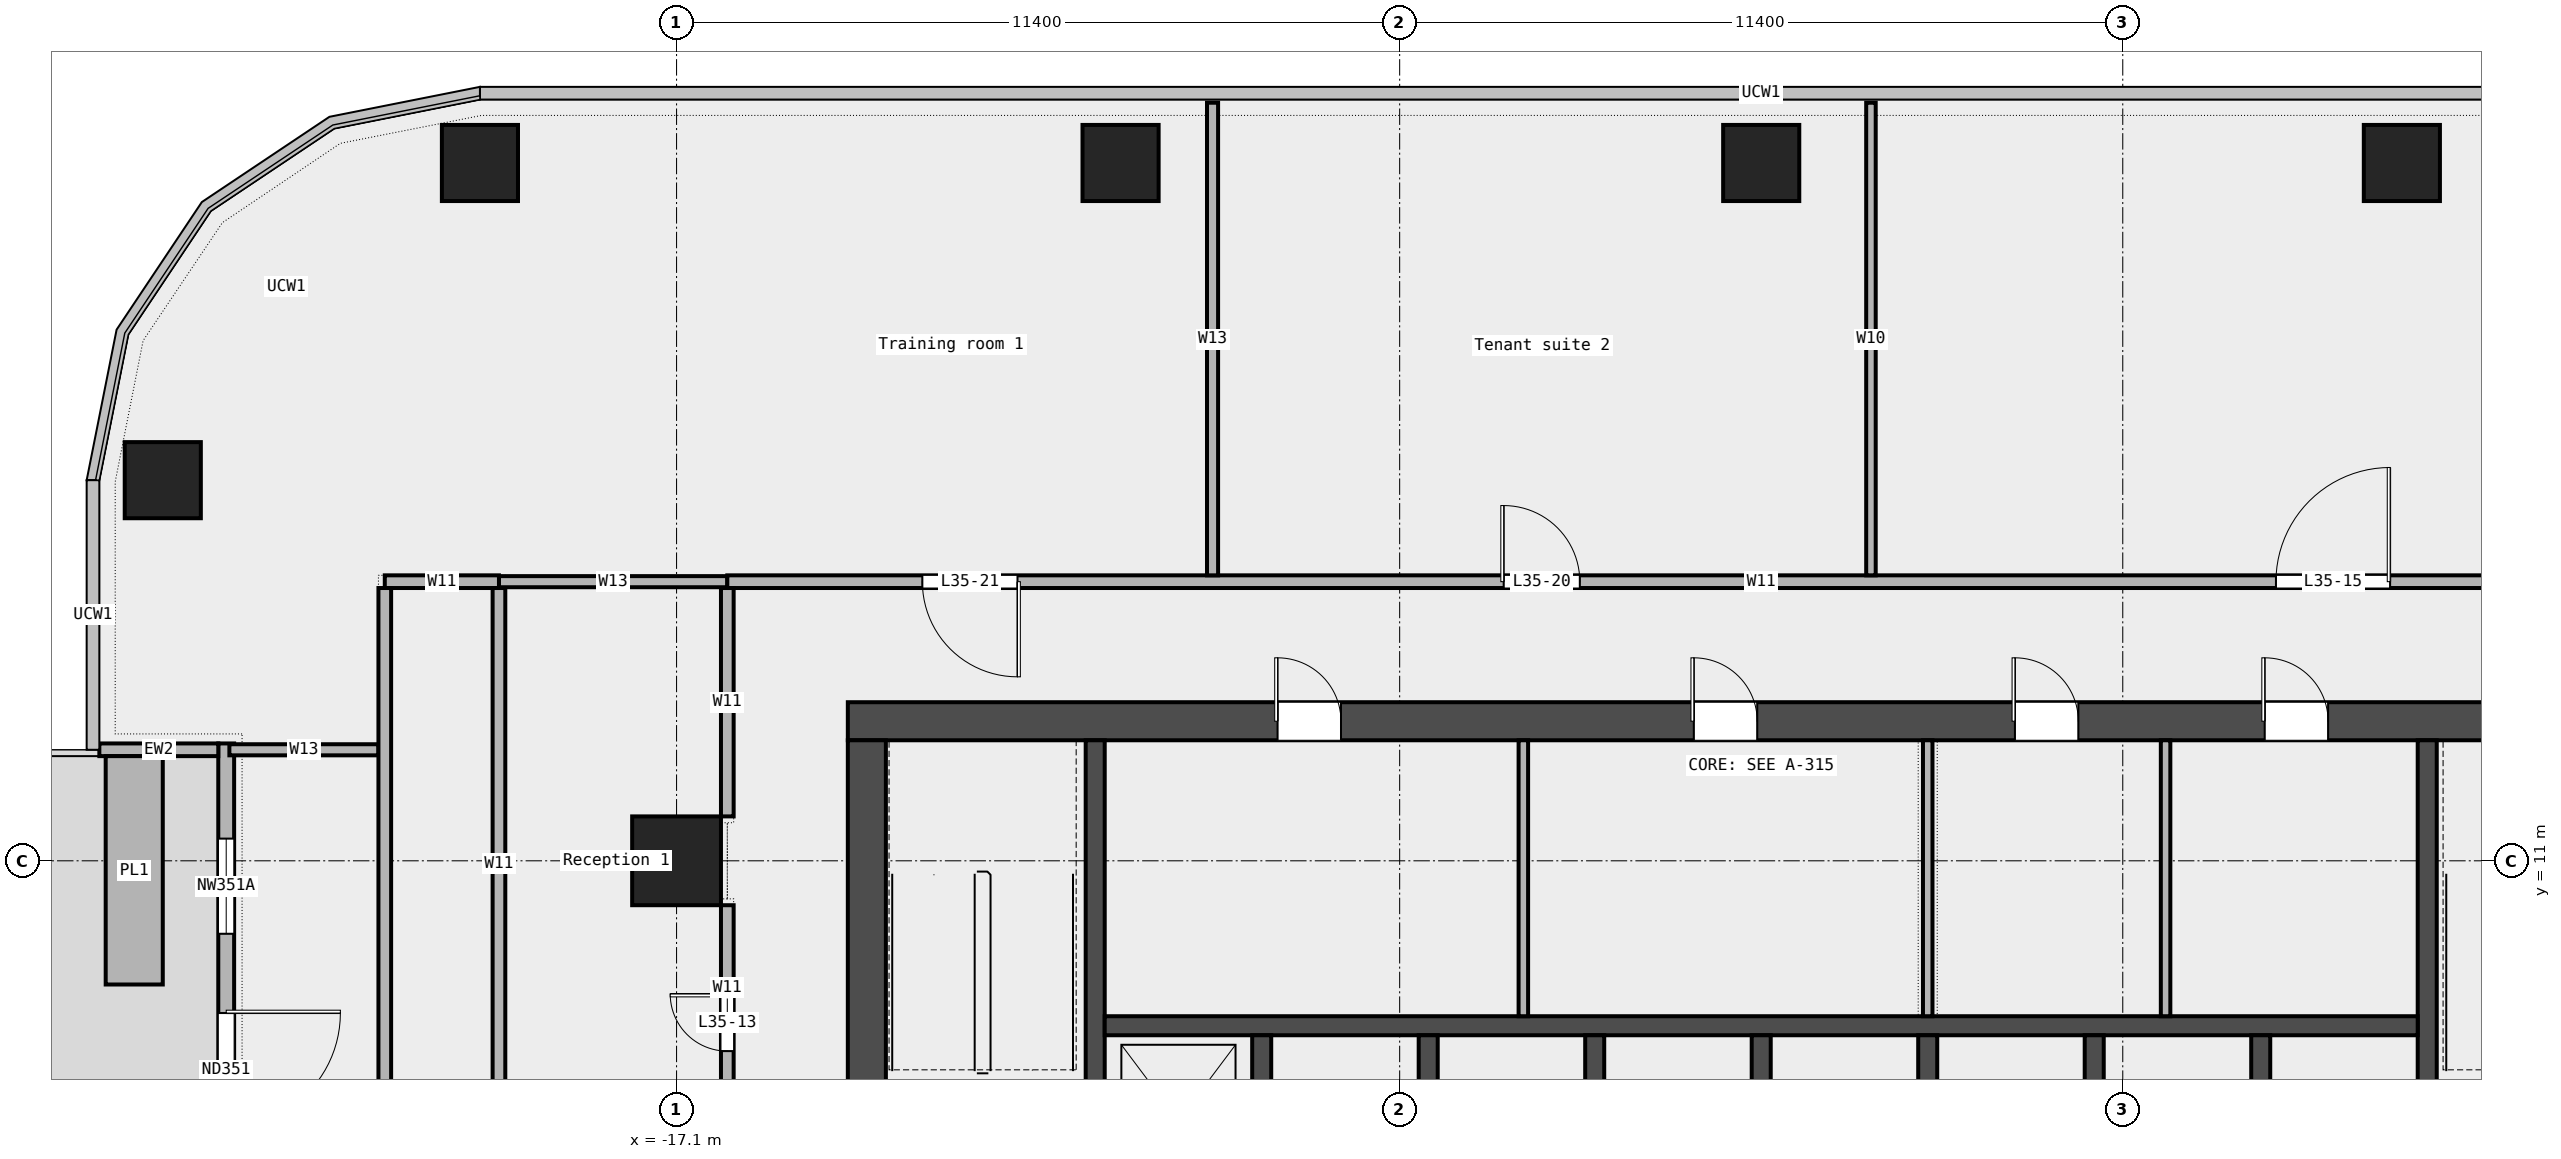
"""IFC4 building model, lengths in metres.
Left out: names, types, materials, properties, quantities, classifications, styles, units other than length and angle.
Written with IfcOpenShell. Run it as: python <this file> out.ifc"""

import sys

from ifc_helpers import new_model, si_unit, direction, frame, frame_2d, origin, origin_2d, place, context, subcontext, project, spatial, rectangle, extrude, element, fill, save


model = new_model("IFC4")
c1 = context("Model", 3, precision=1e-05, world=origin(), true_north=direction((0.0, 1.0)))
c2 = subcontext(c1, "Body", "Model", "MODEL_VIEW")
j1 = project(units=[si_unit("LENGTHUNIT", "METRE"), si_unit("PLANEANGLEUNIT", "RADIAN")], contexts=[c1])
p1 = place(None, origin())
s1 = spatial("IfcSite", under=j1, at=p1, CompositionType="ELEMENT")
p2 = place(p1, origin())
s2 = spatial("IfcBuilding", under=s1, at=p2, CompositionType="ELEMENT")
p3 = place(p2, frame((0.0, 0.0, 173.0)))
s3 = spatial("IfcBuildingStorey", under=s2, at=p3, CompositionType="ELEMENT", Elevation=173.0)
for number, where, z_axis, x_axis in (
    (1, (10.1, 22.0, 0.0), (0.0, 0.0, 1.0), (1.0, 0.0, 0.0)),
    (2, (0.0, 22.0, 0.0), (0.0, 0.0, 1.0), (1.0, 0.0, 0.0)),
    (3, (-10.1, 22.0, 0.0), (0.0, 0.0, 1.0), (1.0, 0.0, 0.0)),
    (4, (-20.2, 22.0, 0.0), (0.0, 0.0, 1.0), (1.0, 0.0, 0.0)),
    (5, (-25.2, 17.0, 0.0), (0.0, 0.0, 1.0), (1.0, 0.0, 0.0)),
):
    element("IfcColumn", number, at=place(p3, frame(where, z_axis=z_axis, x_axis=x_axis)), inside=s3, PredefinedType="COLUMN", context=c2, shape_type="SweptSolid", body=[
        extrude(rectangle(XDim=1.2, YDim=1.2, at=origin_2d()), origin(), (0.0, 0.0, 1.0), 3.6),
    ])
p4 = place(p3, frame((-17.1, 11.0, 0.0), z_axis=(0.0, 0.0, 1.0), x_axis=(1.0, 0.0, 0.0)))
e6 = element("IfcColumn", 6, at=p4, inside=s3, PredefinedType="COLUMN", context=c2, shape_type="SweptSolid", body=[
    extrude(rectangle(XDim=1.4, YDim=1.4, at=origin_2d()), origin(), (0.0, 0.0, 1.0), 3.6),
])
p5 = place(p3, frame((-24.2, 12.85, 0.0), z_axis=(0.0, 0.0, 1.0), x_axis=(0.0, -1.0, 0.0)))
e7 = element("IfcWall", 7, at=p5, inside=s3, PredefinedType="STANDARD", context=c2, shape_type="SweptSolid", body=[
    extrude(rectangle(XDim=12.95, YDim=0.25, at=frame_2d((6.475, 0.0))), origin(), (0.0, 0.0, 1.0), 3.6),
])
p6 = place(p5, frame((1.5, 0.0, 0.45)))
e8 = element("IfcOpeningElement", 8, at=p6, cuts=e7, PredefinedType="OPENING", context=c2, shape_type="SweptSolid", body=[
    extrude(rectangle(XDim=1.5, YDim=2.4, at=frame_2d((0.75, 1.2))), frame((0.0, 0.137, 0.0), z_axis=(0.0, -1.0, 0.0), x_axis=(1.0, 0.0, 0.0)), (0.0, 0.0, 1.0), 0.274),
])
p7 = place(p5, frame((4.25, 0.0, 0.0)))
e9 = element("IfcOpeningElement", 9, at=p7, cuts=e7, PredefinedType="OPENING", context=c2, shape_type="SweptSolid", body=[
    extrude(rectangle(XDim=1.8, YDim=2.4, at=frame_2d((0.9, 1.2))), frame((0.0, 0.137, 0.0), z_axis=(0.0, -1.0, 0.0), x_axis=(1.0, 0.0, 0.0)), (0.0, 0.0, 1.0), 0.274),
])
p8 = place(p5, frame((10.0, 0.0, 0.45)))
e10 = element("IfcOpeningElement", 10, at=p8, cuts=e7, PredefinedType="OPENING", context=c2, shape_type="SweptSolid", body=[
    extrude(rectangle(XDim=1.5, YDim=2.4, at=frame_2d((0.75, 1.2))), frame((0.0, 0.137, 0.0), z_axis=(0.0, -1.0, 0.0), x_axis=(1.0, 0.0, 0.0)), (0.0, 0.0, 1.0), 0.274),
])
p9 = place(p3, frame((-26.2, 12.75, 0.0), z_axis=(0.0, 0.0, 1.0), x_axis=(1.0, 0.0, 0.0)))
e11 = element("IfcWall", 11, at=p9, inside=s3, PredefinedType="STANDARD", context=c2, shape_type="SweptSolid", body=[
    extrude(rectangle(XDim=1.875, YDim=0.2, at=frame_2d((0.938, 0.0))), origin(), (0.0, 0.0, 1.0), 3.6),
])
p10 = place(p3, frame((-25.65, 12.65, 0.0), z_axis=(0.0, 0.0, 1.0), x_axis=(0.0, -1.0, 0.0)))
e12 = element("IfcWall", 12, at=p10, inside=s3, PredefinedType="STANDARD", context=c2, shape_type="SweptSolid", body=[
    extrude(rectangle(XDim=3.6, YDim=0.9, at=frame_2d((1.8, 0.0))), origin(), (0.0, 0.0, 1.0), 0.7),
])
p11 = place(p3, frame((-24.15, 12.75, 0.0), z_axis=(0.0, 0.0, 1.0), x_axis=(1.0, 0.0, 0.0)))
e13 = element("IfcWall", 13, at=p11, inside=s3, PredefinedType="PARTITIONING", context=c2, shape_type="SweptSolid", body=[
    extrude(rectangle(XDim=2.35, YDim=0.175, at=frame_2d((1.175, 0.0))), origin(), (0.0, 0.0, 1.0), 3.6),
])
p12 = place(p3, frame((-19.9, 15.4, 0.0), z_axis=(0.0, 0.0, 1.0), x_axis=(1.0, 0.0, 0.0)))
e14 = element("IfcWall", 14, at=p12, inside=s3, PredefinedType="PARTITIONING", context=c2, shape_type="SweptSolid", body=[
    extrude(rectangle(XDim=3.6, YDim=0.175, at=frame_2d((1.8, 0.0))), origin(), (0.0, 0.0, 1.0), 3.6),
])
p13 = place(p3, frame((-21.7, 15.4, 0.0), z_axis=(0.0, 0.0, 1.0), x_axis=(1.0, 0.0, 0.0)))
e15 = element("IfcWall", 15, at=p13, inside=s3, PredefinedType="PARTITIONING", context=c2, shape_type="SweptSolid", body=[
    extrude(rectangle(XDim=1.8, YDim=0.2, at=frame_2d((0.9, 0.0))), origin(), (0.0, 0.0, 1.0), 3.6),
])
p14 = place(p3, frame((-16.3, 15.4, 0.0), z_axis=(0.0, 0.0, 1.0), x_axis=(1.0, 0.0, 0.0)))
e16 = element("IfcWall", 16, at=p14, inside=s3, PredefinedType="PARTITIONING", context=c2, shape_type="SweptSolid", body=[
    extrude(rectangle(XDim=32.6, YDim=0.2, at=frame_2d((16.3, 0.0))), origin(), (0.0, 0.0, 1.0), 3.6),
])
p15 = place(p14, frame((24.415, 0.0, 0.0)))
e17 = element("IfcOpeningElement", 17, at=p15, cuts=e16, PredefinedType="OPENING", context=c2, shape_type="SweptSolid", body=[
    extrude(rectangle(XDim=1.8, YDim=2.1, at=frame_2d((0.9, 1.05))), frame((0.0, 0.112, 0.0), z_axis=(0.0, -1.0, 0.0), x_axis=(1.0, 0.0, 0.0)), (0.0, 0.0, 1.0), 0.224),
])
p16 = place(p14, frame((12.24, 0.0, 0.0)))
e18 = element("IfcOpeningElement", 18, at=p16, cuts=e16, PredefinedType="OPENING", context=c2, shape_type="SweptSolid", body=[
    extrude(rectangle(XDim=1.2, YDim=2.1, at=frame_2d((0.6, 1.05))), frame((0.0, 0.112, 0.0), z_axis=(0.0, -1.0, 0.0), x_axis=(1.0, 0.0, 0.0)), (0.0, 0.0, 1.0), 0.224),
])
p17 = place(p14, frame((3.075, 0.0, 0.0)))
e19 = element("IfcOpeningElement", 19, at=p17, cuts=e16, PredefinedType="OPENING", context=c2, shape_type="SweptSolid", body=[
    extrude(rectangle(XDim=1.5, YDim=2.1, at=frame_2d((0.75, 1.05))), frame((0.0, 0.112, 0.0), z_axis=(0.0, -1.0, 0.0), x_axis=(1.0, 0.0, 0.0)), (0.0, 0.0, 1.0), 0.224),
])
p18 = place(p3, frame((-21.7, -9.0, 0.0), z_axis=(0.0, 0.0, 1.0), x_axis=(0.0, 1.0, 0.0)))
e20 = element("IfcWall", 20, at=p18, inside=s3, PredefinedType="PARTITIONING", context=c2, shape_type="SweptSolid", body=[
    extrude(rectangle(XDim=24.3, YDim=0.2, at=frame_2d((12.15, 0.0))), origin(), (0.0, 0.0, 1.0), 3.6),
])
p19 = place(p18, frame((14.925, 0.0, 0.0)))
e21 = element("IfcOpeningElement", 21, at=p19, cuts=e20, PredefinedType="OPENING", context=c2, shape_type="SweptSolid", body=[
    extrude(rectangle(XDim=0.9, YDim=2.1, at=frame_2d((0.45, 1.05))), frame((0.0, 0.112, 0.0), z_axis=(0.0, -1.0, 0.0), x_axis=(1.0, 0.0, 0.0)), (0.0, 0.0, 1.0), 0.224),
])
p20 = place(p18, frame((2.562, 0.0, 0.0)))
e22 = element("IfcOpeningElement", 22, at=p20, cuts=e20, PredefinedType="OPENING", context=c2, shape_type="SweptSolid", body=[
    extrude(rectangle(XDim=0.9, YDim=2.1, at=frame_2d((0.45, 1.05))), frame((0.0, 0.112, 0.0), z_axis=(0.0, -1.0, 0.0), x_axis=(1.0, 0.0, 0.0)), (0.0, 0.0, 1.0), 0.224),
])
p21 = place(p3, frame((-19.9, 6.6, 0.0), z_axis=(0.0, 0.0, 1.0), x_axis=(0.0, 1.0, 0.0)))
e23 = element("IfcWall", 23, at=p21, inside=s3, PredefinedType="PARTITIONING", context=c2, shape_type="SweptSolid", body=[
    extrude(rectangle(XDim=8.7, YDim=0.2, at=frame_2d((4.35, 0.0))), origin(), (0.0, 0.0, 1.0), 3.6),
])
p22 = place(p3, frame((-16.3, 6.6, 0.0), z_axis=(0.0, 0.0, 1.0), x_axis=(0.0, 1.0, 0.0)))
e24 = element("IfcWall", 24, at=p22, inside=s3, PredefinedType="PARTITIONING", context=c2, shape_type="SweptSolid", body=[
    extrude(rectangle(XDim=3.7, YDim=0.2, at=frame_2d((1.85, 0.0))), origin(), (0.0, 0.0, 1.0), 3.6),
])
p23 = place(p22, frame((1.4, 0.0, 0.0)))
e25 = element("IfcOpeningElement", 25, at=p23, cuts=e24, PredefinedType="OPENING", context=c2, shape_type="SweptSolid", body=[
    extrude(rectangle(XDim=0.9, YDim=2.1, at=frame_2d((0.45, 1.05))), frame((0.0, 0.112, 0.0), z_axis=(0.0, -1.0, 0.0), x_axis=(1.0, 0.0, 0.0)), (0.0, 0.0, 1.0), 0.224),
])
p24 = place(p3, frame((-16.3, 11.7, 0.0), z_axis=(0.0, 0.0, 1.0), x_axis=(0.0, 1.0, 0.0)))
e26 = element("IfcWall", 26, at=p24, inside=s3, PredefinedType="PARTITIONING", context=c2, shape_type="SweptSolid", body=[
    extrude(rectangle(XDim=3.6, YDim=0.2, at=frame_2d((1.8, 0.0))), origin(), (0.0, 0.0, 1.0), 3.6),
])
p25 = place(p3, frame((-8.65, 15.5, 0.0), z_axis=(0.0, 0.0, 1.0), x_axis=(0.0, 1.0, 0.0)))
e27 = element("IfcWall", 27, at=p25, inside=s3, PredefinedType="PARTITIONING", context=c2, shape_type="SweptSolid", body=[
    extrude(rectangle(XDim=7.45, YDim=0.175, at=frame_2d((3.725, 0.0))), origin(), (0.0, 0.0, 1.0), 3.6),
])
p26 = place(p3, frame((1.73, 15.5, 0.0), z_axis=(0.0, 0.0, 1.0), x_axis=(0.0, 1.0, 0.0)))
e28 = element("IfcWall", 28, at=p26, inside=s3, PredefinedType="PARTITIONING", context=c2, shape_type="SweptSolid", body=[
    extrude(rectangle(XDim=7.45, YDim=0.15, at=frame_2d((3.725, 0.0))), origin(), (0.0, 0.0, 1.0), 3.6),
])
p27 = place(p3, frame((-14.4, 13.2, 0.0), z_axis=(0.0, 0.0, 1.0), x_axis=(1.0, 0.0, 0.0)))
e29 = element("IfcWall", 29, at=p27, inside=s3, PredefinedType="SHEAR", context=c2, shape_type="SweptSolid", body=[
    extrude(rectangle(XDim=28.8, YDim=0.6, at=frame_2d((14.4, 0.0))), origin(), (0.0, 0.0, 1.0), 3.7),
])
p28 = place(p27, frame((6.775, 0.0, 0.0)))
e30 = element("IfcOpeningElement", 30, at=p28, cuts=e29, PredefinedType="OPENING", context=c2, shape_type="SweptSolid", body=[
    extrude(rectangle(XDim=1.0, YDim=2.1, at=frame_2d((0.5, 1.05))), frame((0.0, 0.312, 0.0), z_axis=(0.0, -1.0, 0.0), x_axis=(1.0, 0.0, 0.0)), (0.0, 0.0, 1.0), 0.624),
])
p29 = place(p27, frame((13.337, 0.0, 0.0)))
e31 = element("IfcOpeningElement", 31, at=p29, cuts=e29, PredefinedType="OPENING", context=c2, shape_type="SweptSolid", body=[
    extrude(rectangle(XDim=1.0, YDim=2.1, at=frame_2d((0.5, 1.05))), frame((0.0, 0.312, 0.0), z_axis=(0.0, -1.0, 0.0), x_axis=(1.0, 0.0, 0.0)), (0.0, 0.0, 1.0), 0.624),
])
p30 = place(p27, frame((18.4, 0.0, 0.0)))
e32 = element("IfcOpeningElement", 32, at=p30, cuts=e29, PredefinedType="OPENING", context=c2, shape_type="SweptSolid", body=[
    extrude(rectangle(XDim=1.0, YDim=2.1, at=frame_2d((0.5, 1.05))), frame((0.0, 0.312, 0.0), z_axis=(0.0, -1.0, 0.0), x_axis=(1.0, 0.0, 0.0)), (0.0, 0.0, 1.0), 0.624),
])
p31 = place(p27, frame((22.337, 0.0, 0.0)))
e33 = element("IfcOpeningElement", 33, at=p31, cuts=e29, PredefinedType="OPENING", context=c2, shape_type="SweptSolid", body=[
    extrude(rectangle(XDim=1.0, YDim=2.1, at=frame_2d((0.5, 1.05))), frame((0.0, 0.312, 0.0), z_axis=(0.0, -1.0, 0.0), x_axis=(1.0, 0.0, 0.0)), (0.0, 0.0, 1.0), 0.624),
])
p32 = place(p3, frame((-14.1, -6.6, 0.0), z_axis=(0.0, 0.0, 1.0), x_axis=(0.0, 1.0, 0.0)))
e34 = element("IfcWall", 34, at=p32, inside=s3, PredefinedType="SHEAR", context=c2, shape_type="SweptSolid", body=[
    extrude(rectangle(XDim=19.5, YDim=0.6, at=frame_2d((9.75, 0.0))), origin(), (0.0, 0.0, 1.0), 3.7),
])
p33 = place(p32, frame((9.3, 0.0, 0.0)))
e35 = element("IfcOpeningElement", 35, at=p33, cuts=e34, PredefinedType="OPENING", context=c2, shape_type="SweptSolid", body=[
    extrude(rectangle(XDim=1.8, YDim=2.1, at=frame_2d((0.9, 1.05))), frame((0.0, 0.312, 0.0), z_axis=(0.0, -1.0, 0.0), x_axis=(1.0, 0.0, 0.0)), (0.0, 0.0, 1.0), 0.624),
])
for number, where, z_axis, x_axis in (
    (36, (-10.5, 5.25, 0.0), (0.0, 0.0, 1.0), (0.0, 1.0, 0.0)),
    (37, (10.5, 5.25, 0.0), (0.0, 0.0, 1.0), (0.0, 1.0, 0.0)),
):
    element("IfcWall", number, at=place(p3, frame(where, z_axis=z_axis, x_axis=x_axis)), inside=s3, PredefinedType="SHEAR", context=c2, shape_type="SweptSolid", body=[
        extrude(rectangle(XDim=7.65, YDim=0.3, at=frame_2d((3.825, 0.0))), origin(), (0.0, 0.0, 1.0), 3.7),
    ])
p34 = place(p3, frame((-10.35, 8.4, 0.0), z_axis=(0.0, 0.0, 1.0), x_axis=(1.0, 0.0, 0.0)))
e38 = element("IfcWall", 38, at=p34, inside=s3, PredefinedType="SOLIDWALL", context=c2, shape_type="SweptSolid", body=[
    extrude(rectangle(XDim=20.7, YDim=0.3, at=frame_2d((10.35, 0.0))), origin(), (0.0, 0.0, 1.0), 3.7),
])
for number, where, z_axis, x_axis in (
    (39, (-7.875, 5.55, 0.0), (0.0, 0.0, 1.0), (0.0, 1.0, 0.0)),
    (40, (-5.25, 5.55, 0.0), (0.0, 0.0, 1.0), (0.0, 1.0, 0.0)),
    (41, (-2.625, 5.55, 0.0), (0.0, 0.0, 1.0), (0.0, 1.0, 0.0)),
    (42, (0.0, 5.55, 0.0), (0.0, 0.0, 1.0), (0.0, 1.0, 0.0)),
    (43, (2.625, 5.55, 0.0), (0.0, 0.0, 1.0), (0.0, 1.0, 0.0)),
    (44, (5.25, 5.55, 0.0), (0.0, 0.0, 1.0), (0.0, 1.0, 0.0)),
    (45, (7.875, 5.55, 0.0), (0.0, 0.0, 1.0), (0.0, 1.0, 0.0)),
):
    element("IfcWall", number, at=place(p3, frame(where, z_axis=z_axis, x_axis=x_axis)), inside=s3, PredefinedType="SOLIDWALL", context=c2, shape_type="SweptSolid", body=[
        extrude(rectangle(XDim=2.7, YDim=0.3, at=frame_2d((1.35, 0.0))), origin(), (0.0, 0.0, 1.0), 3.7),
    ])
for number, where, z_axis, x_axis in (
    (46, (-3.75, 8.55, 0.0), (0.0, 0.0, 1.0), (0.0, 1.0, 0.0)),
    (47, (2.625, 8.55, 0.0), (0.0, 0.0, 1.0), (0.0, 1.0, 0.0)),
    (48, (6.375, 8.55, 0.0), (0.0, 0.0, 1.0), (0.0, 1.0, 0.0)),
):
    element("IfcWall", number, at=place(p3, frame(where, z_axis=z_axis, x_axis=x_axis)), inside=s3, PredefinedType="PARTITIONING", context=c2, shape_type="SweptSolid", body=[
        extrude(rectangle(XDim=4.35, YDim=0.15, at=frame_2d((2.175, 0.0))), origin(), (0.0, 0.0, 1.0), 3.7),
    ])
p35 = place(p6, origin())
e49 = element("IfcWindow", 49, at=p35, inside=s3, PartitioningType="SINGLE_PANEL", PredefinedType="WINDOW", context=c2, shape_type="SweptSolid", body=[
    extrude(rectangle(XDim=1.5, YDim=2.4, at=frame_2d((0.75, 1.2))), frame((0.0, 0.03, 0.0), z_axis=(0.0, -1.0, 0.0), x_axis=(1.0, 0.0, 0.0)), (0.0, 0.0, 1.0), 0.06),
])
fill(e8, e49)
p36 = place(p7, origin())
e50 = element("IfcDoor", 50, at=p36, inside=s3, OperationType="DOUBLE_DOOR_SINGLE_SWING", PredefinedType="DOOR", context=c2, shape_type="SweptSolid", body=[
    extrude(rectangle(XDim=1.8, YDim=2.4, at=frame_2d((0.9, 1.2))), frame((0.0, 0.025, 0.0), z_axis=(0.0, -1.0, 0.0), x_axis=(1.0, 0.0, 0.0)), (0.0, 0.0, 1.0), 0.05),
])
fill(e9, e50)
p37 = place(p23, origin())
e51 = element("IfcDoor", 51, at=p37, inside=s3, OperationType="SINGLE_SWING_RIGHT", PredefinedType="DOOR", context=c2, shape_type="SweptSolid", body=[
    extrude(rectangle(XDim=0.9, YDim=2.1, at=frame_2d((0.45, 1.05))), frame((0.0, 0.025, 0.0), z_axis=(0.0, -1.0, 0.0), x_axis=(1.0, 0.0, 0.0)), (0.0, 0.0, 1.0), 0.05),
])
fill(e25, e51)
p38 = place(p15, origin())
e52 = element("IfcDoor", 52, at=p38, inside=s3, OperationType="DOUBLE_DOOR_SINGLE_SWING", PredefinedType="DOOR", context=c2, shape_type="SweptSolid", body=[
    extrude(rectangle(XDim=1.8, YDim=2.1, at=frame_2d((0.9, 1.05))), frame((0.0, 0.025, 0.0), z_axis=(0.0, -1.0, 0.0), x_axis=(1.0, 0.0, 0.0)), (0.0, 0.0, 1.0), 0.05),
])
fill(e17, e52)
p39 = place(p16, origin())
e53 = element("IfcDoor", 53, at=p39, inside=s3, OperationType="SINGLE_SWING_LEFT", PredefinedType="DOOR", context=c2, shape_type="SweptSolid", body=[
    extrude(rectangle(XDim=1.2, YDim=2.1, at=frame_2d((0.6, 1.05))), frame((0.0, 0.025, 0.0), z_axis=(0.0, -1.0, 0.0), x_axis=(1.0, 0.0, 0.0)), (0.0, 0.0, 1.0), 0.05),
])
fill(e18, e53)
p40 = place(p17, origin())
e54 = element("IfcDoor", 54, at=p40, inside=s3, OperationType="DOUBLE_DOOR_SINGLE_SWING", PredefinedType="DOOR", context=c2, shape_type="SweptSolid", body=[
    extrude(rectangle(XDim=1.5, YDim=2.1, at=frame_2d((0.75, 1.05))), frame((0.0, 0.025, 0.0), z_axis=(0.0, -1.0, 0.0), x_axis=(1.0, 0.0, 0.0)), (0.0, 0.0, 1.0), 0.05),
])
fill(e19, e54)
p41 = place(p28, origin())
e55 = element("IfcDoor", 55, at=p41, inside=s3, OperationType="SINGLE_SWING_LEFT", PredefinedType="DOOR", context=c2, shape_type="SweptSolid", body=[
    extrude(rectangle(XDim=1.0, YDim=2.1, at=frame_2d((0.5, 1.05))), frame((0.0, 0.025, 0.0), z_axis=(0.0, -1.0, 0.0), x_axis=(1.0, 0.0, 0.0)), (0.0, 0.0, 1.0), 0.05),
])
fill(e30, e55)
p42 = place(p29, origin())
e56 = element("IfcDoor", 56, at=p42, inside=s3, OperationType="SINGLE_SWING_LEFT", PredefinedType="DOOR", context=c2, shape_type="SweptSolid", body=[
    extrude(rectangle(XDim=1.0, YDim=2.1, at=frame_2d((0.5, 1.05))), frame((0.0, 0.025, 0.0), z_axis=(0.0, -1.0, 0.0), x_axis=(1.0, 0.0, 0.0)), (0.0, 0.0, 1.0), 0.05),
])
fill(e31, e56)
p43 = place(p30, origin())
e57 = element("IfcDoor", 57, at=p43, inside=s3, OperationType="SINGLE_SWING_LEFT", PredefinedType="DOOR", context=c2, shape_type="SweptSolid", body=[
    extrude(rectangle(XDim=1.0, YDim=2.1, at=frame_2d((0.5, 1.05))), frame((0.0, 0.025, 0.0), z_axis=(0.0, -1.0, 0.0), x_axis=(1.0, 0.0, 0.0)), (0.0, 0.0, 1.0), 0.05),
])
fill(e32, e57)
p44 = place(p31, origin())
e58 = element("IfcDoor", 58, at=p44, inside=s3, OperationType="SINGLE_SWING_LEFT", PredefinedType="DOOR", context=c2, shape_type="SweptSolid", body=[
    extrude(rectangle(XDim=1.0, YDim=2.1, at=frame_2d((0.5, 1.05))), frame((0.0, 0.025, 0.0), z_axis=(0.0, -1.0, 0.0), x_axis=(1.0, 0.0, 0.0)), (0.0, 0.0, 1.0), 0.05),
])
fill(e33, e58)
save(model, sys.argv[1])
